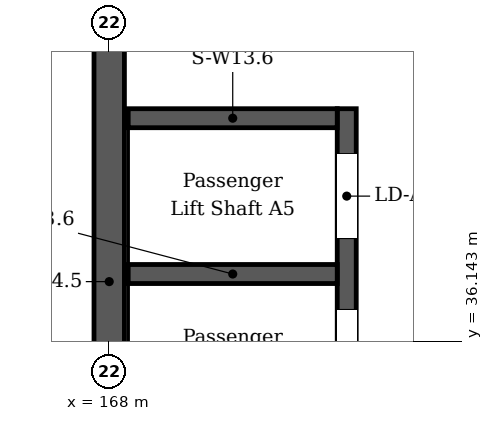
"""IFC4 building model, lengths in metres.
Left out: names, types, materials, properties, quantities, classifications, styles, units other than length and angle.
Written with IfcOpenShell. Run it as: python <this file> out.ifc"""

import sys

from ifc_helpers import new_model, si_unit, direction, frame, frame_2d, origin, place, context, subcontext, project, spatial, rectangle, extrude, element, fill, save


model = new_model("IFC4")
c1 = context("Model", 3, precision=1e-05, world=origin(), true_north=direction((0.0, 1.0)))
c2 = subcontext(c1, "Body", "Model", "MODEL_VIEW")
j1 = project(units=[si_unit("LENGTHUNIT", "METRE"), si_unit("PLANEANGLEUNIT", "RADIAN")], contexts=[c1])
p1 = place(None, origin())
s1 = spatial("IfcSite", under=j1, at=p1, CompositionType="ELEMENT")
p2 = place(p1, origin())
s2 = spatial("IfcBuilding", under=s1, at=p2, CompositionType="ELEMENT")
p3 = place(p2, frame((0.0, 0.0, 64.8)))
s3 = spatial("IfcBuildingStorey", under=s2, at=p3, CompositionType="ELEMENT", Elevation=64.8)
p4 = place(p3, frame((168.0, 25.45, 0.0), z_axis=(0.0, 0.0, 1.0), x_axis=(0.0, 1.0, 0.0)))
e1 = element("IfcWall", 1, at=p4, inside=s3, PredefinedType="SOLIDWALL", context=c2, shape_type="SweptSolid", body=[
    extrude(rectangle(XDim=16.3, YDim=0.4, at=frame_2d((8.15, 0.0))), origin(), (0.0, 0.0, 1.0), 4.324),
])
p5 = place(p3, frame((171.125, 28.3, 0.0), z_axis=(0.0, 0.0, 1.0), x_axis=(0.0, 1.0, 0.0)))
e2 = element("IfcWall", 2, at=p5, inside=s3, PredefinedType="SOLIDWALL", context=c2, shape_type="SweptSolid", body=[
    extrude(rectangle(XDim=10.9, YDim=0.25, at=frame_2d((5.45, 0.0))), origin(), (0.0, 0.0, 1.0), 4.324),
])
p6 = place(p5, frame((0.8, 0.0, 0.0)))
e3 = element("IfcOpeningElement", 3, at=p6, cuts=e2, PredefinedType="OPENING", context=c2, shape_type="SweptSolid", body=[
    extrude(rectangle(XDim=1.1, YDim=2.1, at=frame_2d((0.55, 1.05))), frame((0.0, 0.135, 0.0), z_axis=(0.0, -1.0, 0.0), x_axis=(1.0, 0.0, 0.0)), (0.0, 0.0, 1.0), 0.27),
])
p7 = place(p5, frame((3.05, 0.0, 0.0)))
e4 = element("IfcOpeningElement", 4, at=p7, cuts=e2, PredefinedType="OPENING", context=c2, shape_type="SweptSolid", body=[
    extrude(rectangle(XDim=1.1, YDim=2.1, at=frame_2d((0.55, 1.05))), frame((0.0, 0.135, 0.0), z_axis=(0.0, -1.0, 0.0), x_axis=(1.0, 0.0, 0.0)), (0.0, 0.0, 1.0), 0.27),
])
p8 = place(p5, frame((5.1, 0.0, 0.0)))
e5 = element("IfcOpeningElement", 5, at=p8, cuts=e2, PredefinedType="OPENING", context=c2, shape_type="SweptSolid", body=[
    extrude(rectangle(XDim=1.1, YDim=2.1, at=frame_2d((0.55, 1.05))), frame((0.0, 0.135, 0.0), z_axis=(0.0, -1.0, 0.0), x_axis=(1.0, 0.0, 0.0)), (0.0, 0.0, 1.0), 0.27),
])
p9 = place(p5, frame((7.15, 0.0, 0.0)))
e6 = element("IfcOpeningElement", 6, at=p9, cuts=e2, PredefinedType="OPENING", context=c2, shape_type="SweptSolid", body=[
    extrude(rectangle(XDim=1.1, YDim=2.1, at=frame_2d((0.55, 1.05))), frame((0.0, 0.135, 0.0), z_axis=(0.0, -1.0, 0.0), x_axis=(1.0, 0.0, 0.0)), (0.0, 0.0, 1.0), 0.27),
])
p10 = place(p5, frame((9.2, 0.0, 0.0)))
e7 = element("IfcOpeningElement", 7, at=p10, cuts=e2, PredefinedType="OPENING", context=c2, shape_type="SweptSolid", body=[
    extrude(rectangle(XDim=1.1, YDim=2.1, at=frame_2d((0.55, 1.05))), frame((0.0, 0.135, 0.0), z_axis=(0.0, -1.0, 0.0), x_axis=(1.0, 0.0, 0.0)), (0.0, 0.0, 1.0), 0.27),
])
for number, where, z_axis, x_axis in (
    (8, (168.25, 37.025, 0.0), (0.0, 0.0, 1.0), (1.0, 0.0, 0.0)),
    (9, (168.25, 39.075, 0.0), (0.0, 0.0, 1.0), (1.0, 0.0, 0.0)),
):
    element("IfcWall", number, at=place(p3, frame(where, z_axis=z_axis, x_axis=x_axis)), inside=s3, PredefinedType="SOLIDWALL", context=c2, shape_type="SweptSolid", body=[
        extrude(rectangle(XDim=2.75, YDim=0.25, at=frame_2d((1.375, 0.0))), origin(), (0.0, 0.0, 1.0), 4.324),
    ])
p11 = place(p9, origin())
e10 = element("IfcDoor", 10, at=p11, inside=s3, OperationType="SLIDING_TO_LEFT", PredefinedType="DOOR", context=c2, shape_type="SweptSolid", body=[
    extrude(rectangle(XDim=1.1, YDim=2.1, at=frame_2d((0.55, 1.05))), frame((0.0, 0.025, 0.0), z_axis=(0.0, -1.0, 0.0), x_axis=(1.0, 0.0, 0.0)), (0.0, 0.0, 1.0), 0.05),
])
fill(e6, e10)
p12 = place(p10, origin())
e11 = element("IfcDoor", 11, at=p12, inside=s3, OperationType="SLIDING_TO_LEFT", PredefinedType="DOOR", context=c2, shape_type="SweptSolid", body=[
    extrude(rectangle(XDim=1.1, YDim=2.1, at=frame_2d((0.55, 1.05))), frame((0.0, 0.025, 0.0), z_axis=(0.0, -1.0, 0.0), x_axis=(1.0, 0.0, 0.0)), (0.0, 0.0, 1.0), 0.05),
])
fill(e7, e11)
save(model, sys.argv[1])
